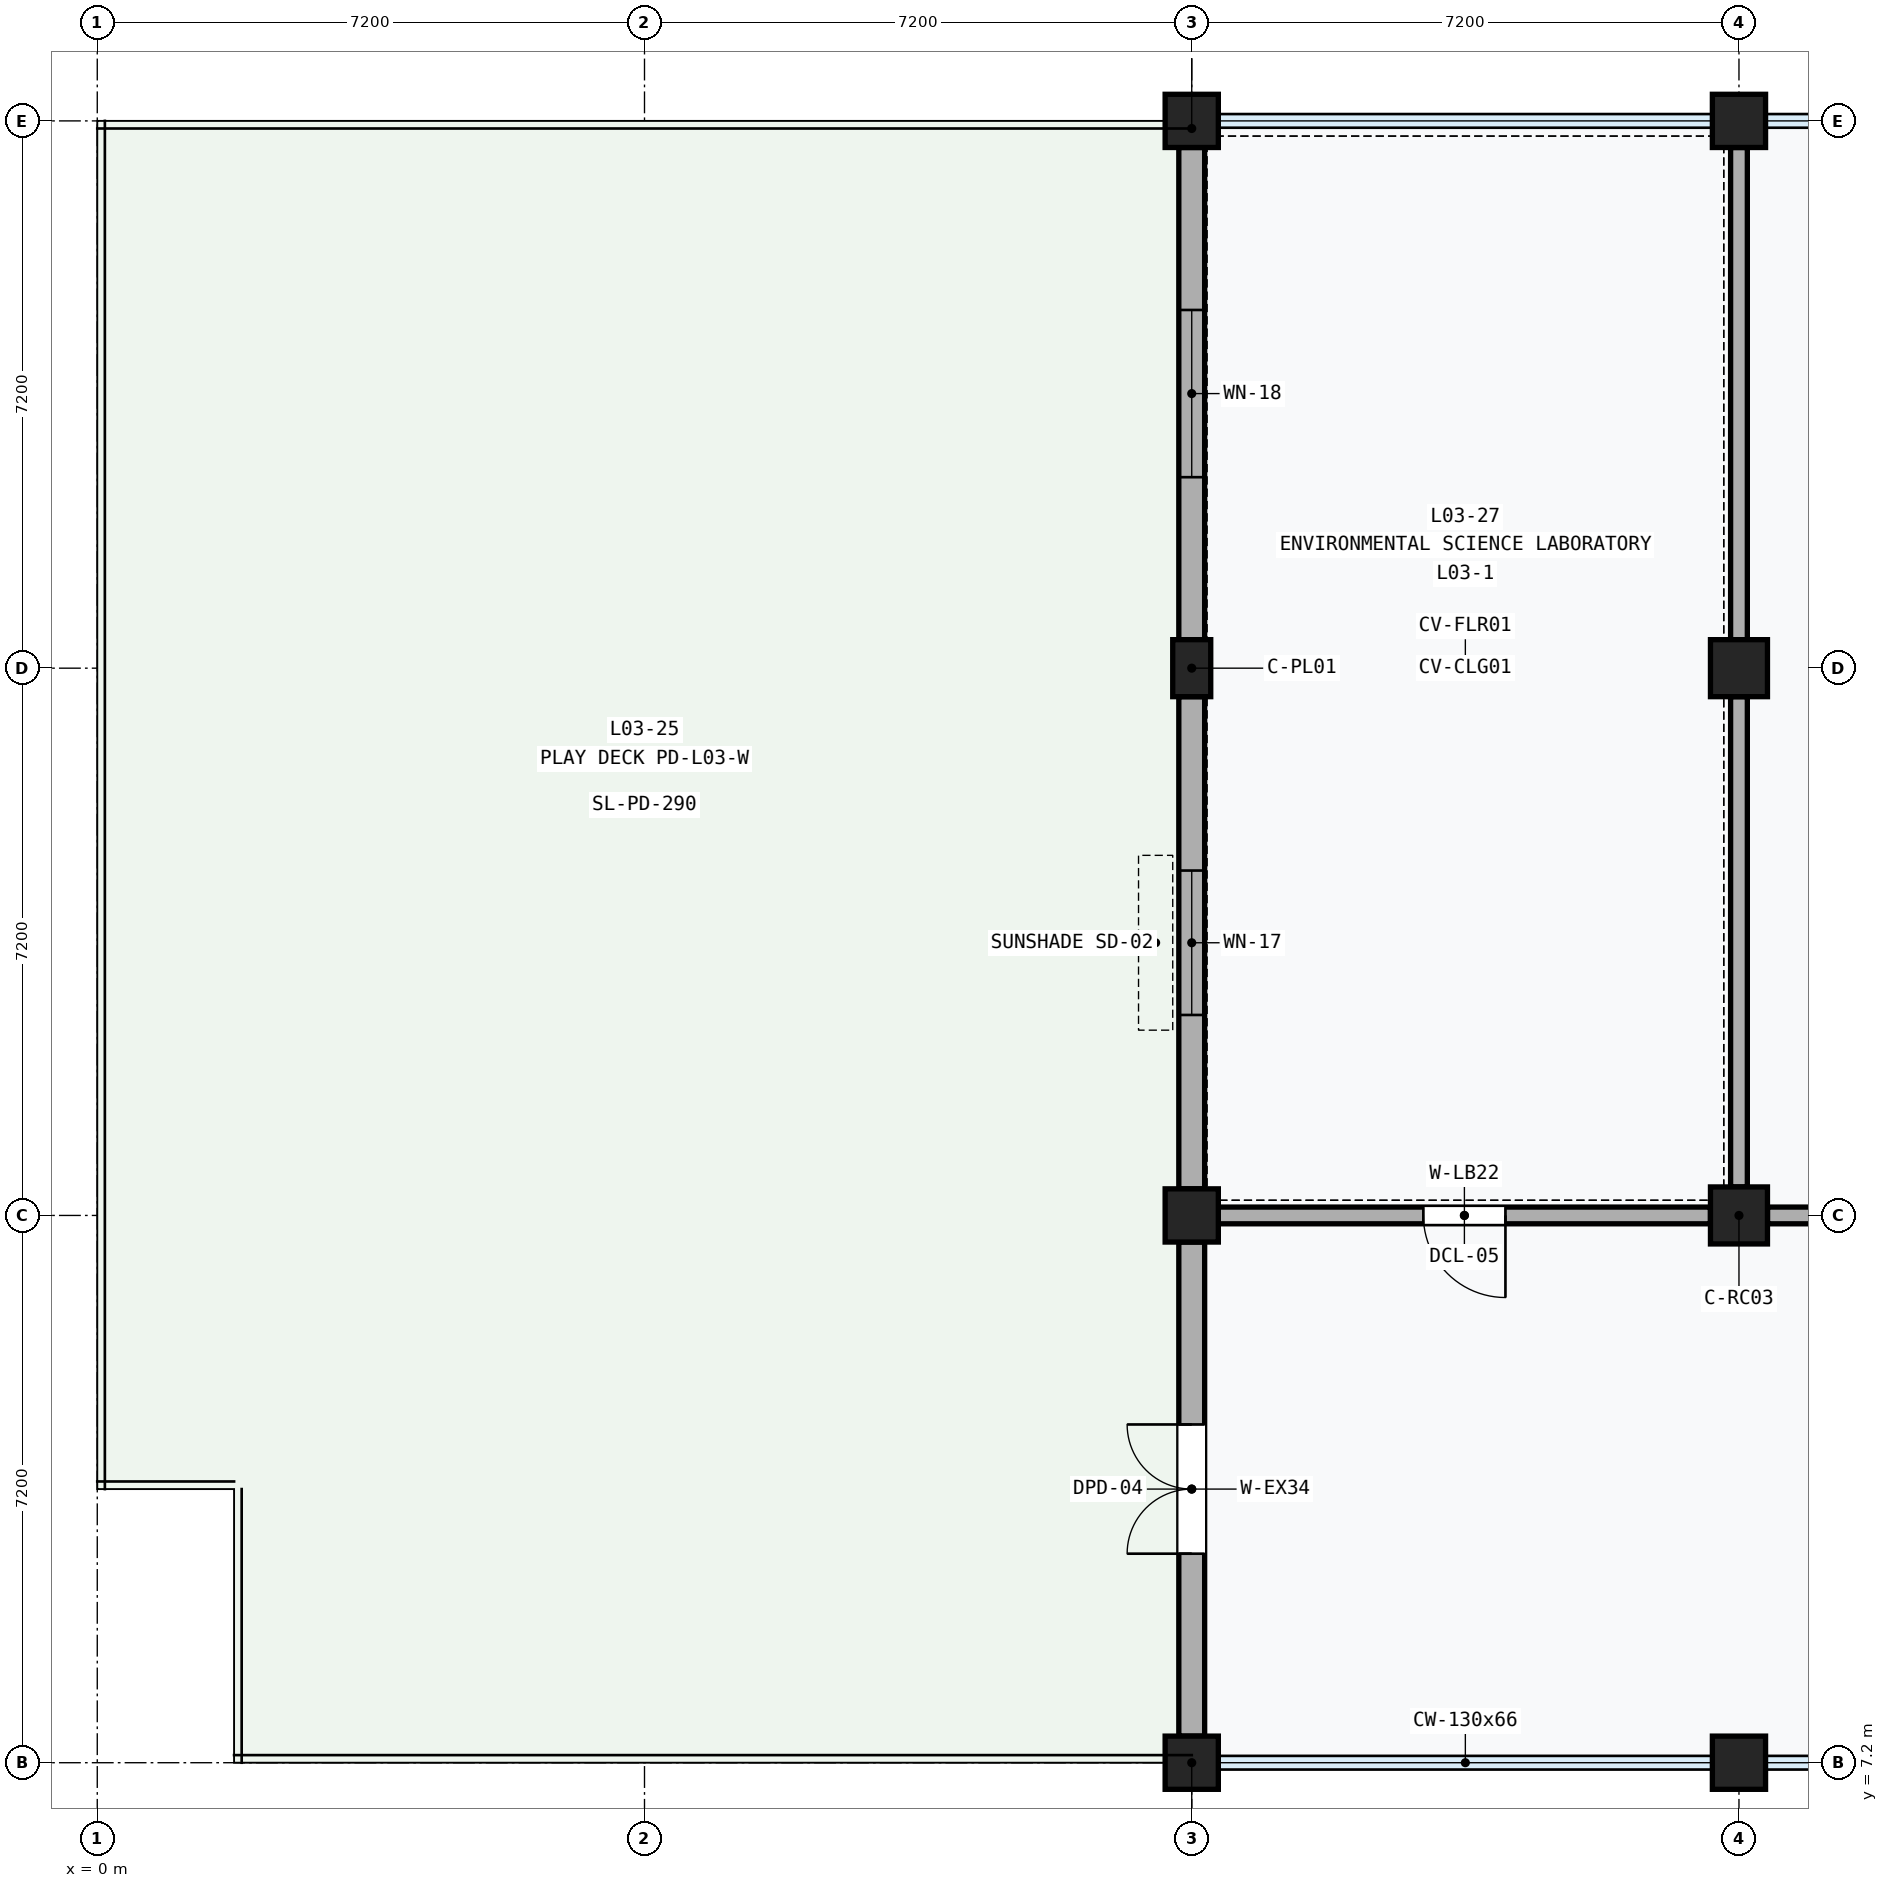
"""IFC4 building model, lengths in metres.
Left out: names, types, materials, properties, quantities, classifications, styles, units other than length and angle.
Written with IfcOpenShell. Run it as: python <this file> out.ifc"""

import sys

from ifc_helpers import new_model, si_unit, direction, frame, frame_2d, origin, origin_2d, place, context, subcontext, project, spatial, rectangle, extrude, element, fill, save


model = new_model("IFC4")
c1 = context("Model", 3, precision=1e-05, world=origin(), true_north=direction((0.0, 1.0)))
c2 = subcontext(c1, "Body", "Model", "MODEL_VIEW")
j1 = project(units=[si_unit("LENGTHUNIT", "METRE"), si_unit("PLANEANGLEUNIT", "RADIAN")], contexts=[c1])
p1 = place(None, origin())
s1 = spatial("IfcSite", under=j1, at=p1, CompositionType="ELEMENT")
p2 = place(p1, origin())
s2 = spatial("IfcBuilding", under=s1, at=p2, CompositionType="ELEMENT")
p3 = place(p2, frame((0.0, 0.0, 14.4)))
s3 = spatial("IfcBuildingStorey", under=s2, at=p3, CompositionType="ELEMENT", Elevation=14.4)
for number, where, z_axis, x_axis in (
    (1, (14.4, 7.2, 0.0), (0.0, 0.0, 1.0), (1.0, 0.0, 0.0)),
    (2, (14.4, 14.4, 0.0), (0.0, 0.0, 1.0), (1.0, 0.0, 0.0)),
):
    element("IfcColumn", number, at=place(p3, frame(where, z_axis=z_axis, x_axis=x_axis)), inside=s3, PredefinedType="COLUMN", context=c2, shape_type="SweptSolid", body=[
        extrude(rectangle(XDim=0.7, YDim=0.7, at=origin_2d()), origin(), (0.0, 0.0, 1.0), 4.2),
    ])
p4 = place(p3, frame((14.4, 21.6, 0.0), z_axis=(0.0, 0.0, 1.0), x_axis=(1.0, 0.0, 0.0)))
e3 = element("IfcColumn", 3, at=p4, inside=s3, PredefinedType="PILASTER", context=c2, shape_type="SweptSolid", body=[
    extrude(rectangle(XDim=0.5, YDim=0.75, at=origin_2d()), origin(), (0.0, 0.0, 1.0), 4.2),
])
for number, where, z_axis, x_axis in (
    (4, (14.4, 28.8, 0.0), (0.0, 0.0, 1.0), (1.0, 0.0, 0.0)),
    (5, (21.6, 7.2, 0.0), (0.0, 0.0, 1.0), (1.0, 0.0, 0.0)),
):
    element("IfcColumn", number, at=place(p3, frame(where, z_axis=z_axis, x_axis=x_axis)), inside=s3, PredefinedType="COLUMN", context=c2, shape_type="SweptSolid", body=[
        extrude(rectangle(XDim=0.7, YDim=0.7, at=origin_2d()), origin(), (0.0, 0.0, 1.0), 4.2),
    ])
for number, where, z_axis, x_axis in (
    (6, (21.6, 14.4, 0.0), (0.0, 0.0, 1.0), (1.0, 0.0, 0.0)),
    (7, (21.6, 21.6, 0.0), (0.0, 0.0, 1.0), (1.0, 0.0, 0.0)),
):
    element("IfcColumn", number, at=place(p3, frame(where, z_axis=z_axis, x_axis=x_axis)), inside=s3, PredefinedType="COLUMN", context=c2, shape_type="SweptSolid", body=[
        extrude(rectangle(XDim=0.75, YDim=0.75, at=origin_2d()), origin(), (0.0, 0.0, 1.0), 4.2),
    ])
p5 = place(p3, frame((21.6, 28.8, 0.0), z_axis=(0.0, 0.0, 1.0), x_axis=(1.0, 0.0, 0.0)))
e8 = element("IfcColumn", 8, at=p5, inside=s3, PredefinedType="COLUMN", context=c2, shape_type="SweptSolid", body=[
    extrude(rectangle(XDim=0.7, YDim=0.7, at=origin_2d()), origin(), (0.0, 0.0, 1.0), 4.2),
])
p6 = place(p3, frame((14.4, 7.55, 0.0), z_axis=(0.0, 0.0, 1.0), x_axis=(0.0, 1.0, 0.0)))
e9 = element("IfcWall", 9, at=p6, inside=s3, PredefinedType="SOLIDWALL", context=c2, shape_type="SweptSolid", body=[
    extrude(rectangle(XDim=6.5, YDim=0.34, at=frame_2d((3.25, 0.0))), origin(), (0.0, 0.0, 1.0), 3.31),
])
p7 = place(p6, frame((2.4, 0.0, 0.0)))
e10 = element("IfcOpeningElement", 10, at=p7, cuts=e9, PredefinedType="OPENING", context=c2, shape_type="SweptSolid", body=[
    extrude(rectangle(XDim=1.7, YDim=2.2, at=frame_2d((0.85, 1.1))), frame((0.0, 0.182, 0.0), z_axis=(0.0, -1.0, 0.0), x_axis=(1.0, 0.0, 0.0)), (0.0, 0.0, 1.0), 0.364),
])
p8 = place(p3, frame((14.4, 14.75, 0.0), z_axis=(0.0, 0.0, 1.0), x_axis=(0.0, 1.0, 0.0)))
e11 = element("IfcWall", 11, at=p8, inside=s3, PredefinedType="SOLIDWALL", context=c2, shape_type="SweptSolid", body=[
    extrude(rectangle(XDim=6.475, YDim=0.34, at=frame_2d((3.238, 0.0))), origin(), (0.0, 0.0, 1.0), 3.31),
])
p9 = place(p8, frame((2.288, 0.0, 1.1)))
e12 = element("IfcOpeningElement", 12, at=p9, cuts=e11, PredefinedType="OPENING", context=c2, shape_type="SweptSolid", body=[
    extrude(rectangle(XDim=1.9, YDim=1.5, at=frame_2d((0.95, 0.75))), frame((0.0, 0.182, 0.0), z_axis=(0.0, -1.0, 0.0), x_axis=(1.0, 0.0, 0.0)), (0.0, 0.0, 1.0), 0.364),
])
p10 = place(p3, frame((14.4, 21.975, 0.0), z_axis=(0.0, 0.0, 1.0), x_axis=(0.0, 1.0, 0.0)))
e13 = element("IfcWall", 13, at=p10, inside=s3, PredefinedType="SOLIDWALL", context=c2, shape_type="SweptSolid", body=[
    extrude(rectangle(XDim=6.475, YDim=0.34, at=frame_2d((3.237, 0.0))), origin(), (0.0, 0.0, 1.0), 3.31),
])
p11 = place(p10, frame((2.137, 0.0, 1.1)))
e14 = element("IfcOpeningElement", 14, at=p11, cuts=e13, PredefinedType="OPENING", context=c2, shape_type="SweptSolid", body=[
    extrude(rectangle(XDim=2.2, YDim=1.5, at=frame_2d((1.1, 0.75))), frame((0.0, 0.182, 0.0), z_axis=(0.0, -1.0, 0.0), x_axis=(1.0, 0.0, 0.0)), (0.0, 0.0, 1.0), 0.364),
])
p12 = place(p3, frame((14.75, 14.4, 0.0), z_axis=(0.0, 0.0, 1.0), x_axis=(1.0, 0.0, 0.0)))
e15 = element("IfcWall", 15, at=p12, inside=s3, PredefinedType="PARTITIONING", context=c2, shape_type="SweptSolid", body=[
    extrude(rectangle(XDim=6.475, YDim=0.22, at=frame_2d((3.238, 0.0))), origin(), (0.0, 0.0, 1.0), 3.24),
])
p13 = place(p12, frame((2.698, 0.0, 0.0)))
e16 = element("IfcOpeningElement", 16, at=p13, cuts=e15, PredefinedType="OPENING", context=c2, shape_type="SweptSolid", body=[
    extrude(rectangle(XDim=1.08, YDim=2.18, at=frame_2d((0.54, 1.09))), frame((0.0, 0.122, 0.0), z_axis=(0.0, -1.0, 0.0), x_axis=(1.0, 0.0, 0.0)), (0.0, 0.0, 1.0), 0.244),
])
p14 = place(p3, frame((21.6, 14.775, 0.0), z_axis=(0.0, 0.0, 1.0), x_axis=(0.0, 1.0, 0.0)))
e17 = element("IfcWall", 17, at=p14, inside=s3, PredefinedType="PARTITIONING", context=c2, shape_type="SweptSolid", body=[
    extrude(rectangle(XDim=6.45, YDim=0.22, at=frame_2d((3.225, 0.0))), origin(), (0.0, 0.0, 1.0), 3.17),
])
p15 = place(p3, frame((21.6, 21.975, 0.0), z_axis=(0.0, 0.0, 1.0), x_axis=(0.0, 1.0, 0.0)))
e18 = element("IfcWall", 18, at=p15, inside=s3, PredefinedType="PARTITIONING", context=c2, shape_type="SweptSolid", body=[
    extrude(rectangle(XDim=6.475, YDim=0.22, at=frame_2d((3.237, 0.0))), origin(), (0.0, 0.0, 1.0), 3.17),
])
p16 = place(p3, frame((21.975, 14.4, 0.0), z_axis=(0.0, 0.0, 1.0), x_axis=(1.0, 0.0, 0.0)))
e19 = element("IfcWall", 19, at=p16, inside=s3, PredefinedType="PARTITIONING", context=c2, shape_type="SweptSolid", body=[
    extrude(rectangle(XDim=6.45, YDim=0.22, at=frame_2d((3.225, 0.0))), origin(), (0.0, 0.0, 1.0), 3.17),
])
p17 = place(p16, frame((2.665, 0.0, 0.0)))
e20 = element("IfcOpeningElement", 20, at=p17, cuts=e19, PredefinedType="OPENING", context=c2, shape_type="SweptSolid", body=[
    extrude(rectangle(XDim=1.12, YDim=2.2, at=frame_2d((0.56, 1.1))), frame((0.0, 0.122, 0.0), z_axis=(0.0, -1.0, 0.0), x_axis=(1.0, 0.0, 0.0)), (0.0, 0.0, 1.0), 0.244),
])
p18 = place(p7, origin())
e21 = element("IfcDoor", 21, at=p18, inside=s3, OperationType="DOUBLE_DOOR_SINGLE_SWING", PredefinedType="DOOR", context=c2, shape_type="SweptSolid", body=[
    extrude(rectangle(XDim=1.7, YDim=2.2, at=frame_2d((0.85, 1.1))), frame((0.0, 0.025, 0.0), z_axis=(0.0, -1.0, 0.0), x_axis=(1.0, 0.0, 0.0)), (0.0, 0.0, 1.0), 0.05),
])
fill(e10, e21)
p19 = place(p9, origin())
e22 = element("IfcWindow", 22, at=p19, inside=s3, PartitioningType="SINGLE_PANEL", PredefinedType="WINDOW", context=c2, shape_type="SweptSolid", body=[
    extrude(rectangle(XDim=1.9, YDim=1.5, at=frame_2d((0.95, 0.75))), frame((0.0, 0.03, 0.0), z_axis=(0.0, -1.0, 0.0), x_axis=(1.0, 0.0, 0.0)), (0.0, 0.0, 1.0), 0.06),
])
fill(e12, e22)
p20 = place(p11, origin())
e23 = element("IfcWindow", 23, at=p20, inside=s3, PartitioningType="SINGLE_PANEL", PredefinedType="WINDOW", context=c2, shape_type="SweptSolid", body=[
    extrude(rectangle(XDim=2.2, YDim=1.5, at=frame_2d((1.1, 0.75))), frame((0.0, 0.03, 0.0), z_axis=(0.0, -1.0, 0.0), x_axis=(1.0, 0.0, 0.0)), (0.0, 0.0, 1.0), 0.06),
])
fill(e14, e23)
p21 = place(p13, frame((1.08, 0.0, 0.0), z_axis=(0.0, 0.0, 1.0), x_axis=(-1.0, 0.0, 0.0)))
e24 = element("IfcDoor", 24, at=p21, inside=s3, OperationType="SINGLE_SWING_LEFT", PredefinedType="DOOR", context=c2, shape_type="SweptSolid", body=[
    extrude(rectangle(XDim=1.08, YDim=2.18, at=frame_2d((0.54, 1.09))), frame((0.0, 0.025, 0.0), z_axis=(0.0, -1.0, 0.0), x_axis=(1.0, 0.0, 0.0)), (0.0, 0.0, 1.0), 0.05),
])
fill(e16, e24)
save(model, sys.argv[1])
